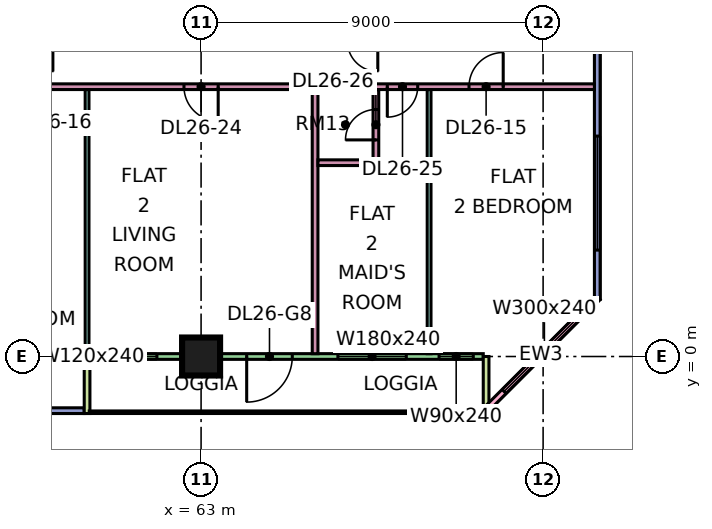
"""IFC4 building model, lengths in metres.
Left out: names, types, materials, properties, quantities, classifications, styles, units other than length and angle.
Written with IfcOpenShell. Run it as: python <this file> out.ifc"""

import sys

from ifc_helpers import new_model, si_unit, direction, frame, frame_2d, origin, origin_2d, place, context, subcontext, project, spatial, rectangle, extrude, element, fill, save


model = new_model("IFC4")
c1 = context("Model", 3, precision=1e-05, world=origin(), true_north=direction((0.0, 1.0)))
c2 = subcontext(c1, "Body", "Model", "MODEL_VIEW")
j1 = project(units=[si_unit("LENGTHUNIT", "METRE"), si_unit("PLANEANGLEUNIT", "RADIAN")], contexts=[c1])
p1 = place(None, origin())
s1 = spatial("IfcSite", under=j1, at=p1, CompositionType="ELEMENT")
p2 = place(p1, origin())
s2 = spatial("IfcBuilding", under=s1, at=p2, CompositionType="ELEMENT")
p3 = place(p2, frame((0.0, 0.0, 114.4)))
s3 = spatial("IfcBuildingStorey", under=s2, at=p3, CompositionType="ELEMENT", Elevation=114.4)
p4 = place(p3, frame((63.0, 0.0, 0.0), z_axis=(0.0, 0.0, 1.0), x_axis=(1.0, 0.0, 0.0)))
e1 = element("IfcColumn", 1, at=p4, inside=s3, PredefinedType="COLUMN", context=c2, shape_type="SweptSolid", body=[
    extrude(rectangle(XDim=1.0, YDim=1.0, at=origin_2d()), origin(), (0.0, 0.0, 1.0), 3.75),
])
p5 = place(p3, frame((48.075, -1.425, 0.0), z_axis=(0.0, 0.0, 1.0), x_axis=(1.0, 0.0, 0.0)))
e2 = element("IfcWall", 2, at=p5, inside=s3, PredefinedType="SOLIDWALL", context=c2, shape_type="SweptSolid", body=[
    extrude(rectangle(XDim=11.85, YDim=0.15, at=frame_2d((5.925, 0.0))), origin(), (0.0, 0.0, 1.0), 3.35),
])
p6 = place(p5, frame((0.562, 0.0, 0.45)))
e3 = element("IfcOpeningElement", 3, at=p6, cuts=e2, PredefinedType="OPENING", context=c2, shape_type="SweptSolid", body=[
    extrude(rectangle(XDim=1.8, YDim=2.4, at=frame_2d((0.9, 1.2))), frame((0.0, 0.085, 0.0), z_axis=(0.0, -1.0, 0.0), x_axis=(1.0, 0.0, 0.0)), (0.0, 0.0, 1.0), 0.17),
])
p7 = place(p5, frame((3.525, 0.0, 0.45)))
e4 = element("IfcOpeningElement", 4, at=p7, cuts=e2, PredefinedType="OPENING", context=c2, shape_type="SweptSolid", body=[
    extrude(rectangle(XDim=1.8, YDim=2.4, at=frame_2d((0.9, 1.2))), frame((0.0, 0.085, 0.0), z_axis=(0.0, -1.0, 0.0), x_axis=(1.0, 0.0, 0.0)), (0.0, 0.0, 1.0), 0.17),
])
p8 = place(p5, frame((7.387, 0.0, 0.45)))
e5 = element("IfcOpeningElement", 5, at=p8, cuts=e2, PredefinedType="OPENING", context=c2, shape_type="SweptSolid", body=[
    extrude(rectangle(XDim=3.0, YDim=2.4, at=frame_2d((1.5, 1.2))), frame((0.0, 0.085, 0.0), z_axis=(0.0, -1.0, 0.0), x_axis=(1.0, 0.0, 0.0)), (0.0, 0.0, 1.0), 0.17),
])
p9 = place(p3, frame((60.075, 0.0, 0.0), z_axis=(0.0, 0.0, 1.0), x_axis=(1.0, 0.0, 0.0)))
e6 = element("IfcWall", 6, at=p9, inside=s3, PredefinedType="SOLIDWALL", context=c2, shape_type="SweptSolid", body=[
    extrude(rectangle(XDim=10.35, YDim=0.15, at=frame_2d((5.175, 0.0))), origin(), (0.0, 0.0, 1.0), 3.35),
])
p10 = place(p9, frame((0.562, 0.0, 0.45)))
e7 = element("IfcOpeningElement", 7, at=p10, cuts=e6, PredefinedType="OPENING", context=c2, shape_type="SweptSolid", body=[
    extrude(rectangle(XDim=1.2, YDim=2.4, at=frame_2d((0.6, 1.2))), frame((0.0, 0.085, 0.0), z_axis=(0.0, -1.0, 0.0), x_axis=(1.0, 0.0, 0.0)), (0.0, 0.0, 1.0), 0.17),
])
p11 = place(p9, frame((4.125, 0.0, 0.0)))
e8 = element("IfcOpeningElement", 8, at=p11, cuts=e6, PredefinedType="OPENING", context=c2, shape_type="SweptSolid", body=[
    extrude(rectangle(XDim=1.2, YDim=2.4, at=frame_2d((0.6, 1.2))), frame((0.0, 0.085, 0.0), z_axis=(0.0, -1.0, 0.0), x_axis=(1.0, 0.0, 0.0)), (0.0, 0.0, 1.0), 0.17),
])
p12 = place(p9, frame((6.525, 0.0, 0.45)))
e9 = element("IfcOpeningElement", 9, at=p12, cuts=e6, PredefinedType="OPENING", context=c2, shape_type="SweptSolid", body=[
    extrude(rectangle(XDim=1.8, YDim=2.4, at=frame_2d((0.9, 1.2))), frame((0.0, 0.085, 0.0), z_axis=(0.0, -1.0, 0.0), x_axis=(1.0, 0.0, 0.0)), (0.0, 0.0, 1.0), 0.17),
])
p13 = place(p9, frame((9.188, 0.0, 0.45)))
e10 = element("IfcOpeningElement", 10, at=p13, cuts=e6, PredefinedType="OPENING", context=c2, shape_type="SweptSolid", body=[
    extrude(rectangle(XDim=0.9, YDim=2.4, at=frame_2d((0.45, 1.2))), frame((0.0, 0.085, 0.0), z_axis=(0.0, -1.0, 0.0), x_axis=(1.0, 0.0, 0.0)), (0.0, 0.0, 1.0), 0.17),
])
for number, where, z_axis, x_axis in (
    (11, (60.0, -1.5, 0.0), (0.0, 0.0, 1.0), (0.0, 1.0, 0.0)),
    (12, (70.5, -1.5, 0.0), (0.0, 0.0, 1.0), (0.0, 1.0, 0.0)),
):
    element("IfcWall", number, at=place(p3, frame(where, z_axis=z_axis, x_axis=x_axis)), inside=s3, PredefinedType="SOLIDWALL", context=c2, shape_type="SweptSolid", body=[
        extrude(rectangle(XDim=1.5, YDim=0.15, at=frame_2d((0.75, 0.0))), origin(), (0.0, 0.0, 1.0), 3.35),
    ])
p14 = place(p3, frame((70.447, -1.447, 0.0), z_axis=(0.0, 0.0, 1.0), x_axis=(0.707106781187, 0.707106781187, 0.0)))
e13 = element("IfcWall", 13, at=p14, inside=s3, PredefinedType="SOLIDWALL", context=c2, shape_type="SweptSolid", body=[
    extrude(rectangle(XDim=4.243, YDim=0.15, at=frame_2d((2.121, 0.0))), origin(), (0.0, 0.0, 1.0), 3.35),
])
p15 = place(p14, frame((0.744, 0.0, 0.45)))
e14 = element("IfcOpeningElement", 14, at=p15, cuts=e13, PredefinedType="OPENING", context=c2, shape_type="SweptSolid", body=[
    extrude(rectangle(XDim=3.0, YDim=2.4, at=frame_2d((1.5, 1.2))), frame((0.0, 0.085, 0.0), z_axis=(0.0, -1.0, 0.0), x_axis=(1.0, 0.0, 0.0)), (0.0, 0.0, 1.0), 0.17),
])
p16 = place(p3, frame((73.425, 1.5, 0.0), z_axis=(0.0, 0.0, 1.0), x_axis=(0.0, 1.0, 0.0)))
e15 = element("IfcWall", 15, at=p16, inside=s3, PredefinedType="SOLIDWALL", context=c2, shape_type="SweptSolid", body=[
    extrude(rectangle(XDim=10.425, YDim=0.15, at=frame_2d((5.212, 0.0))), origin(), (0.0, 0.0, 1.0), 3.35),
])
p17 = place(p16, frame((1.3, 0.0, 0.45)))
e16 = element("IfcOpeningElement", 16, at=p17, cuts=e15, PredefinedType="OPENING", context=c2, shape_type="SweptSolid", body=[
    extrude(rectangle(XDim=3.0, YDim=2.4, at=frame_2d((1.5, 1.2))), frame((0.0, 0.085, 0.0), z_axis=(0.0, -1.0, 0.0), x_axis=(1.0, 0.0, 0.0)), (0.0, 0.0, 1.0), 0.17),
])
p18 = place(p16, frame((8.012, 0.0, 1.7)))
e17 = element("IfcOpeningElement", 17, at=p18, cuts=e15, PredefinedType="OPENING", context=c2, shape_type="SweptSolid", body=[
    extrude(rectangle(XDim=1.2, YDim=0.9, at=frame_2d((0.6, 0.45))), frame((0.0, 0.085, 0.0), z_axis=(0.0, -1.0, 0.0), x_axis=(1.0, 0.0, 0.0)), (0.0, 0.0, 1.0), 0.17),
])
p19 = place(p3, frame((48.1, 7.1, 0.0), z_axis=(0.0, 0.0, 1.0), x_axis=(1.0, 0.0, 0.0)))
e18 = element("IfcWall", 18, at=p19, inside=s3, PredefinedType="PARTITIONING", context=c2, shape_type="SweptSolid", body=[
    extrude(rectangle(XDim=25.25, YDim=0.15, at=frame_2d((12.625, 0.0))), origin(), (0.0, 0.0, 1.0), 3.35),
])
p20 = place(p19, frame((0.95, 0.0, 0.0)))
e19 = element("IfcOpeningElement", 19, at=p20, cuts=e18, PredefinedType="OPENING", context=c2, shape_type="SweptSolid", body=[
    extrude(rectangle(XDim=0.9, YDim=2.1, at=frame_2d((0.45, 1.05))), frame((0.0, 0.085, 0.0), z_axis=(0.0, -1.0, 0.0), x_axis=(1.0, 0.0, 0.0)), (0.0, 0.0, 1.0), 0.17),
])
p21 = place(p19, frame((21.95, 0.0, 0.0)))
e20 = element("IfcOpeningElement", 20, at=p21, cuts=e18, PredefinedType="OPENING", context=c2, shape_type="SweptSolid", body=[
    extrude(rectangle(XDim=0.9, YDim=2.1, at=frame_2d((0.45, 1.05))), frame((0.0, 0.085, 0.0), z_axis=(0.0, -1.0, 0.0), x_axis=(1.0, 0.0, 0.0)), (0.0, 0.0, 1.0), 0.17),
])
p22 = place(p19, frame((9.95, 0.0, 0.0)))
e21 = element("IfcOpeningElement", 21, at=p22, cuts=e18, PredefinedType="OPENING", context=c2, shape_type="SweptSolid", body=[
    extrude(rectangle(XDim=0.9, YDim=2.1, at=frame_2d((0.45, 1.05))), frame((0.0, 0.085, 0.0), z_axis=(0.0, -1.0, 0.0), x_axis=(1.0, 0.0, 0.0)), (0.0, 0.0, 1.0), 0.17),
])
p23 = place(p19, frame((14.45, 0.0, 0.0)))
e22 = element("IfcOpeningElement", 22, at=p23, cuts=e18, PredefinedType="OPENING", context=c2, shape_type="SweptSolid", body=[
    extrude(rectangle(XDim=0.9, YDim=2.1, at=frame_2d((0.45, 1.05))), frame((0.0, 0.085, 0.0), z_axis=(0.0, -1.0, 0.0), x_axis=(1.0, 0.0, 0.0)), (0.0, 0.0, 1.0), 0.17),
])
p24 = place(p19, frame((19.8, 0.0, 0.0)))
e23 = element("IfcOpeningElement", 23, at=p24, cuts=e18, PredefinedType="OPENING", context=c2, shape_type="SweptSolid", body=[
    extrude(rectangle(XDim=0.8, YDim=2.1, at=frame_2d((0.4, 1.05))), frame((0.0, 0.085, 0.0), z_axis=(0.0, -1.0, 0.0), x_axis=(1.0, 0.0, 0.0)), (0.0, 0.0, 1.0), 0.17),
])
p25 = place(p19, frame((3.95, 0.0, 0.0)))
e24 = element("IfcOpeningElement", 24, at=p25, cuts=e18, PredefinedType="OPENING", context=c2, shape_type="SweptSolid", body=[
    extrude(rectangle(XDim=0.9, YDim=2.1, at=frame_2d((0.45, 1.05))), frame((0.0, 0.085, 0.0), z_axis=(0.0, -1.0, 0.0), x_axis=(1.0, 0.0, 0.0)), (0.0, 0.0, 1.0), 0.17),
])
p26 = place(p3, frame((60.0, 0.0, 0.0), z_axis=(0.0, 0.0, 1.0), x_axis=(0.0, 1.0, 0.0)))
e25 = element("IfcWall", 25, at=p26, inside=s3, PredefinedType="PARTITIONING", context=c2, shape_type="SweptSolid", body=[
    extrude(rectangle(XDim=7.025, YDim=0.1, at=frame_2d((3.512, 0.0))), origin(), (0.0, 0.0, 1.0), 3.35),
])
p27 = place(p3, frame((66.0, 0.074, 0.0), z_axis=(0.0, 0.0, 1.0), x_axis=(0.0, 1.0, 0.0)))
e26 = element("IfcWall", 26, at=p27, inside=s3, PredefinedType="PARTITIONING", context=c2, shape_type="SweptSolid", body=[
    extrude(rectangle(XDim=6.951, YDim=0.15, at=frame_2d((3.476, 0.0))), origin(), (0.0, 0.0, 1.0), 3.35),
])
p28 = place(p3, frame((66.075, 5.1, 0.0), z_axis=(0.0, 0.0, 1.0), x_axis=(1.0, 0.0, 0.0)))
e27 = element("IfcWall", 27, at=p28, inside=s3, PredefinedType="PARTITIONING", context=c2, shape_type="SweptSolid", body=[
    extrude(rectangle(XDim=1.45, YDim=0.15, at=frame_2d((0.725, 0.0))), origin(), (0.0, 0.0, 1.0), 3.35),
])
p29 = place(p3, frame((67.6, 5.025, 0.0), z_axis=(0.0, 0.0, 1.0), x_axis=(0.0, 1.0, 0.0)))
e28 = element("IfcWall", 28, at=p29, inside=s3, PredefinedType="PARTITIONING", context=c2, shape_type="SweptSolid", body=[
    extrude(rectangle(XDim=2.0, YDim=0.15, at=frame_2d((1.0, 0.0))), origin(), (0.0, 0.0, 1.0), 3.35),
])
p30 = place(p29, frame((0.675, 0.0, 0.0)))
e29 = element("IfcOpeningElement", 29, at=p30, cuts=e28, PredefinedType="OPENING", context=c2, shape_type="SweptSolid", body=[
    extrude(rectangle(XDim=0.8, YDim=2.1, at=frame_2d((0.4, 1.05))), frame((0.0, 0.085, 0.0), z_axis=(0.0, -1.0, 0.0), x_axis=(1.0, 0.0, 0.0)), (0.0, 0.0, 1.0), 0.17),
])
p31 = place(p3, frame((69.0, 0.074, 0.0), z_axis=(0.0, 0.0, 1.0), x_axis=(0.0, 1.0, 0.0)))
e30 = element("IfcWall", 30, at=p31, inside=s3, PredefinedType="PARTITIONING", context=c2, shape_type="SweptSolid", body=[
    extrude(rectangle(XDim=6.951, YDim=0.1, at=frame_2d((3.476, 0.0))), origin(), (0.0, 0.0, 1.0), 3.35),
])
p32 = place(p10, origin())
e31 = element("IfcWindow", 31, at=p32, inside=s3, PartitioningType="SINGLE_PANEL", PredefinedType="WINDOW", context=c2, shape_type="SweptSolid", body=[
    extrude(rectangle(XDim=1.2, YDim=2.4, at=frame_2d((0.6, 1.2))), frame((0.0, 0.03, 0.0), z_axis=(0.0, -1.0, 0.0), x_axis=(1.0, 0.0, 0.0)), (0.0, 0.0, 1.0), 0.06),
])
fill(e7, e31)
p33 = place(p11, frame((1.2, 0.0, 0.0), z_axis=(0.0, 0.0, 1.0), x_axis=(-1.0, 0.0, 0.0)))
e32 = element("IfcDoor", 32, at=p33, inside=s3, OperationType="DOUBLE_DOOR_SINGLE_SWING", PredefinedType="DOOR", context=c2, shape_type="SweptSolid", body=[
    extrude(rectangle(XDim=1.2, YDim=2.4, at=frame_2d((0.6, 1.2))), frame((0.0, 0.025, 0.0), z_axis=(0.0, -1.0, 0.0), x_axis=(1.0, 0.0, 0.0)), (0.0, 0.0, 1.0), 0.05),
])
fill(e8, e32)
p34 = place(p12, origin())
e33 = element("IfcWindow", 33, at=p34, inside=s3, PartitioningType="SINGLE_PANEL", PredefinedType="WINDOW", context=c2, shape_type="SweptSolid", body=[
    extrude(rectangle(XDim=1.8, YDim=2.4, at=frame_2d((0.9, 1.2))), frame((0.0, 0.03, 0.0), z_axis=(0.0, -1.0, 0.0), x_axis=(1.0, 0.0, 0.0)), (0.0, 0.0, 1.0), 0.06),
])
fill(e9, e33)
p35 = place(p13, origin())
e34 = element("IfcWindow", 34, at=p35, inside=s3, PartitioningType="SINGLE_PANEL", PredefinedType="WINDOW", context=c2, shape_type="SweptSolid", body=[
    extrude(rectangle(XDim=0.9, YDim=2.4, at=frame_2d((0.45, 1.2))), frame((0.0, 0.03, 0.0), z_axis=(0.0, -1.0, 0.0), x_axis=(1.0, 0.0, 0.0)), (0.0, 0.0, 1.0), 0.06),
])
fill(e10, e34)
p36 = place(p15, origin())
e35 = element("IfcWindow", 35, at=p36, inside=s3, PartitioningType="SINGLE_PANEL", PredefinedType="WINDOW", context=c2, shape_type="SweptSolid", body=[
    extrude(rectangle(XDim=3.0, YDim=2.4, at=frame_2d((1.5, 1.2))), frame((0.0, 0.03, 0.0), z_axis=(0.0, -1.0, 0.0), x_axis=(1.0, 0.0, 0.0)), (0.0, 0.0, 1.0), 0.06),
])
fill(e14, e35)
p37 = place(p17, origin())
e36 = element("IfcWindow", 36, at=p37, inside=s3, PartitioningType="SINGLE_PANEL", PredefinedType="WINDOW", context=c2, shape_type="SweptSolid", body=[
    extrude(rectangle(XDim=3.0, YDim=2.4, at=frame_2d((1.5, 1.2))), frame((0.0, 0.03, 0.0), z_axis=(0.0, -1.0, 0.0), x_axis=(1.0, 0.0, 0.0)), (0.0, 0.0, 1.0), 0.06),
])
fill(e16, e36)
p38 = place(p21, frame((0.9, 0.0, 0.0), z_axis=(0.0, 0.0, 1.0), x_axis=(-1.0, 0.0, 0.0)))
e37 = element("IfcDoor", 37, at=p38, inside=s3, OperationType="SINGLE_SWING_RIGHT", PredefinedType="DOOR", context=c2, shape_type="SweptSolid", body=[
    extrude(rectangle(XDim=0.9, YDim=2.1, at=frame_2d((0.45, 1.05))), frame((0.0, 0.025, 0.0), z_axis=(0.0, -1.0, 0.0), x_axis=(1.0, 0.0, 0.0)), (0.0, 0.0, 1.0), 0.05),
])
fill(e20, e37)
p39 = place(p23, origin())
e38 = element("IfcDoor", 38, at=p39, inside=s3, OperationType="SINGLE_SWING_RIGHT", PredefinedType="DOOR", context=c2, shape_type="SweptSolid", body=[
    extrude(rectangle(XDim=0.9, YDim=2.1, at=frame_2d((0.45, 1.05))), frame((0.0, 0.025, 0.0), z_axis=(0.0, -1.0, 0.0), x_axis=(1.0, 0.0, 0.0)), (0.0, 0.0, 1.0), 0.05),
])
fill(e22, e38)
p40 = place(p24, frame((0.8, 0.0, 0.0), z_axis=(0.0, 0.0, 1.0), x_axis=(-1.0, 0.0, 0.0)))
e39 = element("IfcDoor", 39, at=p40, inside=s3, OperationType="SINGLE_SWING_LEFT", PredefinedType="DOOR", context=c2, shape_type="SweptSolid", body=[
    extrude(rectangle(XDim=0.8, YDim=2.1, at=frame_2d((0.4, 1.05))), frame((0.0, 0.025, 0.0), z_axis=(0.0, -1.0, 0.0), x_axis=(1.0, 0.0, 0.0)), (0.0, 0.0, 1.0), 0.05),
])
fill(e23, e39)
p41 = place(p30, origin())
e40 = element("IfcDoor", 40, at=p41, inside=s3, OperationType="SINGLE_SWING_LEFT", PredefinedType="DOOR", context=c2, shape_type="SweptSolid", body=[
    extrude(rectangle(XDim=0.8, YDim=2.1, at=frame_2d((0.4, 1.05))), frame((0.0, 0.025, 0.0), z_axis=(0.0, -1.0, 0.0), x_axis=(1.0, 0.0, 0.0)), (0.0, 0.0, 1.0), 0.05),
])
fill(e29, e40)
save(model, sys.argv[1])
